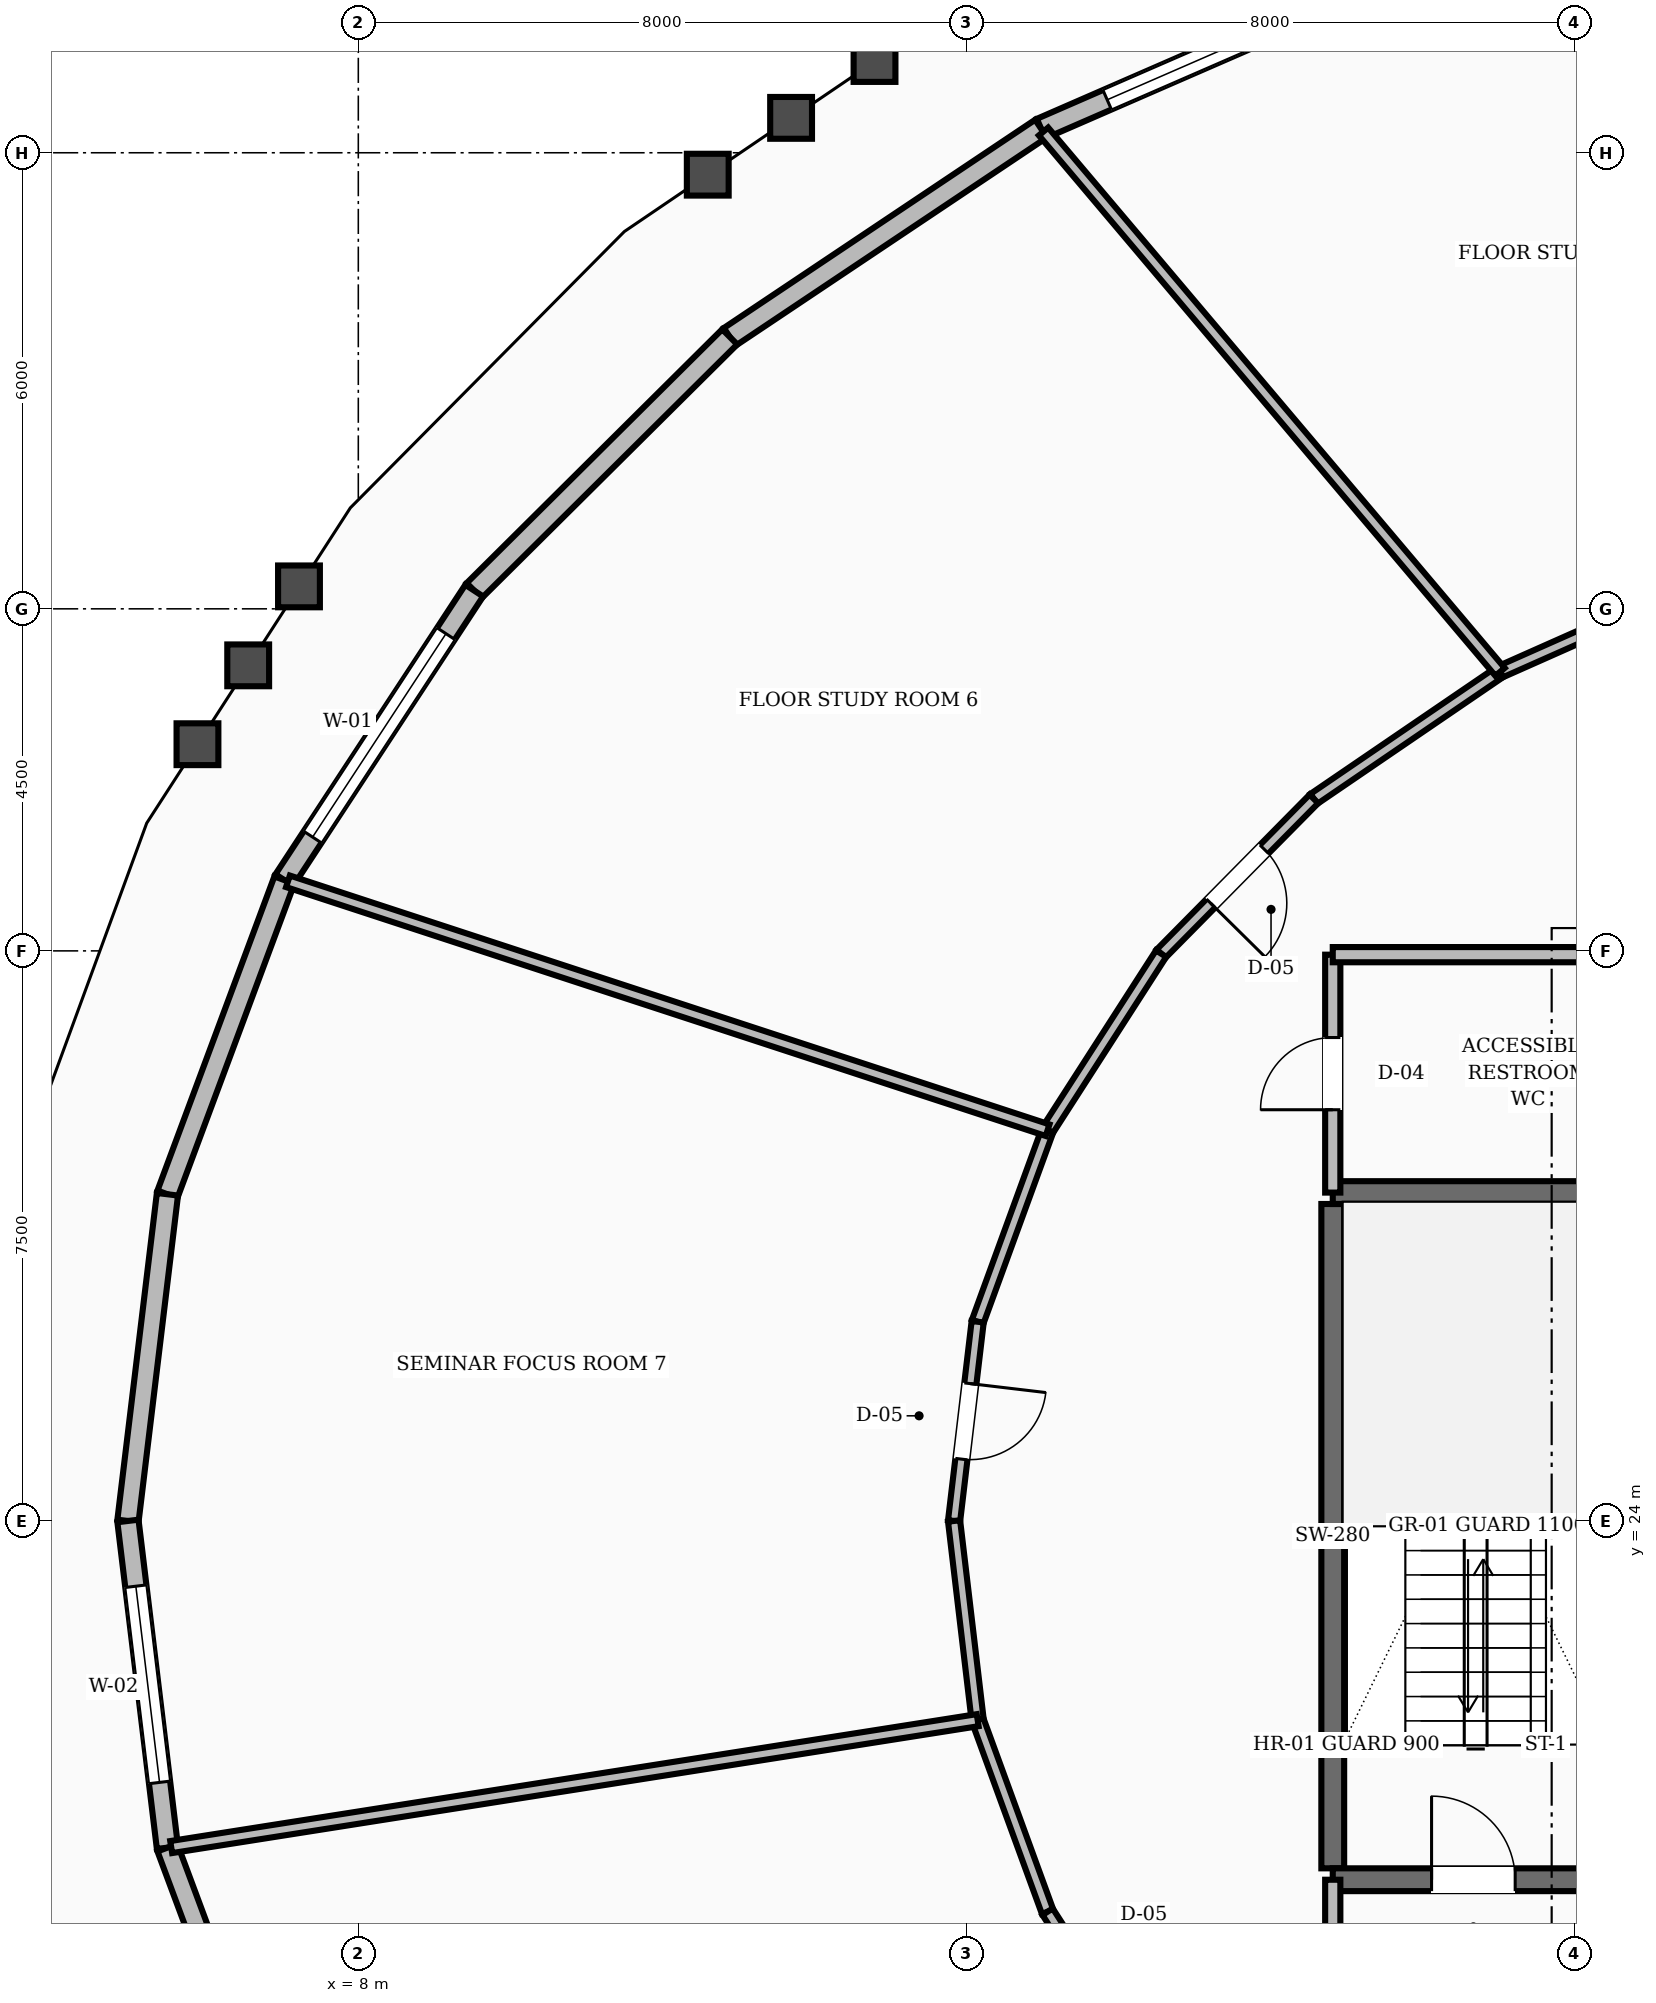
"""IFC4 building model, lengths in metres.
Left out: names, types, materials, properties, quantities, classifications, styles, units other than length and angle.
Written with IfcOpenShell. Run it as: python <this file> out.ifc"""

import sys

from ifc_helpers import new_model, si_unit, direction, frame, frame_2d, origin, place, context, subcontext, project, spatial, rectangle, extrude, element, fill, save


model = new_model("IFC4")
c1 = context("Model", 3, precision=1e-05, world=origin(), true_north=direction((0.0, 1.0)))
c2 = subcontext(c1, "Body", "Model", "MODEL_VIEW")
j1 = project(units=[si_unit("LENGTHUNIT", "METRE"), si_unit("PLANEANGLEUNIT", "RADIAN")], contexts=[c1])
p1 = place(None, origin())
s1 = spatial("IfcSite", under=j1, at=p1, CompositionType="ELEMENT")
p2 = place(p1, origin())
s2 = spatial("IfcBuilding", under=s1, at=p2, CompositionType="ELEMENT")
p3 = place(p2, frame((0.0, 0.0, 77.2)))
s3 = spatial("IfcBuildingStorey", under=s2, at=p3, CompositionType="ELEMENT", Elevation=77.2)
p4 = place(p3, frame((20.82, 19.43, 0.0), z_axis=(0.0, 0.0, 1.0), x_axis=(0.0, 1.0, 0.0)))
e1 = element("IfcWall", 1, at=p4, inside=s3, PredefinedType="SHEAR", context=c2, shape_type="SweptSolid", body=[
    extrude(rectangle(XDim=8.74, YDim=0.3, at=frame_2d((4.37, 0.0))), origin(), (0.0, 0.0, 1.0), 3.6),
])
p5 = place(p3, frame((20.82, 19.28, 0.0), z_axis=(0.0, 0.0, 1.0), x_axis=(1.0, 0.0, 0.0)))
e2 = element("IfcWall", 2, at=p5, inside=s3, PredefinedType="SHEAR", context=c2, shape_type="SweptSolid", body=[
    extrude(rectangle(XDim=3.6, YDim=0.3, at=frame_2d((1.8, 0.0))), origin(), (0.0, 0.0, 1.0), 3.6),
])
p6 = place(p5, frame((1.3, 0.0, 0.0)))
e3 = element("IfcOpeningElement", 3, at=p6, cuts=e2, PredefinedType="OPENING", context=c2, shape_type="SweptSolid", body=[
    extrude(rectangle(XDim=1.1, YDim=2.1, at=frame_2d((0.55, 1.05))), frame((0.0, 0.16, 0.0), z_axis=(0.0, -1.0, 0.0), x_axis=(1.0, 0.0, 0.0)), (0.0, 0.0, 1.0), 0.32),
])
p7 = place(p3, frame((20.82, 28.32, 0.0), z_axis=(0.0, 0.0, 1.0), x_axis=(1.0, 0.0, 0.0)))
e4 = element("IfcWall", 4, at=p7, inside=s3, PredefinedType="SHEAR", context=c2, shape_type="SweptSolid", body=[
    extrude(rectangle(XDim=3.6, YDim=0.3, at=frame_2d((1.8, 0.0))), origin(), (0.0, 0.0, 1.0), 3.6),
])
p8 = place(p3, frame((21.656, 44.354, 0.0), z_axis=(0.0, 0.0, 1.0), x_axis=(-0.916792657637, -0.399363522249, 0.0)))
e5 = element("IfcWall", 5, at=p8, inside=s3, PredefinedType="STANDARD", context=c2, shape_type="SweptSolid", body=[
    extrude(rectangle(XDim=5.097, YDim=0.28, at=frame_2d((2.549, 0.0))), origin(), (0.0, 0.0, 1.0), 2.71),
])
p9 = place(p8, frame((0.949, 0.0, 0.8)))
e6 = element("IfcOpeningElement", 6, at=p9, cuts=e5, PredefinedType="OPENING", context=c2, shape_type="SweptSolid", body=[
    extrude(rectangle(XDim=3.2, YDim=1.65, at=frame_2d((1.6, 0.825))), frame((0.0, 0.15, 0.0), z_axis=(0.0, -1.0, 0.0), x_axis=(1.0, 0.0, 0.0)), (0.0, 0.0, 1.0), 0.3),
])
p10 = place(p3, frame((16.983, 42.318, 0.0), z_axis=(0.0, 0.0, 1.0), x_axis=(-0.83118805146, -0.555991387623, 0.0)))
e7 = element("IfcWall", 7, at=p10, inside=s3, PredefinedType="STANDARD", context=c2, shape_type="SweptSolid", body=[
    extrude(rectangle(XDim=4.928, YDim=0.28, at=frame_2d((2.464, 0.0))), origin(), (0.0, 0.0, 1.0), 2.71),
])
p11 = place(p3, frame((12.886, 39.578, 0.0), z_axis=(0.0, 0.0, 1.0), x_axis=(-0.709550335899, -0.704654752929, 0.0)))
e8 = element("IfcWall", 8, at=p11, inside=s3, PredefinedType="STANDARD", context=c2, shape_type="SweptSolid", body=[
    extrude(rectangle(XDim=4.738, YDim=0.28, at=frame_2d((2.369, 0.0))), origin(), (0.0, 0.0, 1.0), 2.71),
])
p12 = place(p3, frame((9.525, 36.24, 0.0), z_axis=(0.0, 0.0, 1.0), x_axis=(-0.548388300237, -0.836223817027, 0.0)))
e9 = element("IfcWall", 9, at=p12, inside=s3, PredefinedType="STANDARD", context=c2, shape_type="SweptSolid", body=[
    extrude(rectangle(XDim=4.555, YDim=0.28, at=frame_2d((2.277, 0.0))), origin(), (0.0, 0.0, 1.0), 2.71),
])
p13 = place(p12, frame((0.677, 0.0, 0.8)))
e10 = element("IfcOpeningElement", 10, at=p13, cuts=e9, PredefinedType="OPENING", context=c2, shape_type="SweptSolid", body=[
    extrude(rectangle(XDim=3.2, YDim=1.65, at=frame_2d((1.6, 0.825))), frame((0.0, 0.15, 0.0), z_axis=(0.0, -1.0, 0.0), x_axis=(1.0, 0.0, 0.0)), (0.0, 0.0, 1.0), 0.3),
])
p14 = place(p3, frame((7.027, 32.431, 0.0), z_axis=(0.0, 0.0, 1.0), x_axis=(-0.348859248306, -0.93717513031, 0.0)))
e11 = element("IfcWall", 11, at=p14, inside=s3, PredefinedType="STANDARD", context=c2, shape_type="SweptSolid", body=[
    extrude(rectangle(XDim=4.41, YDim=0.28, at=frame_2d((2.205, 0.0))), origin(), (0.0, 0.0, 1.0), 2.71),
])
p15 = place(p3, frame((5.489, 28.298, 0.0), z_axis=(0.0, 0.0, 1.0), x_axis=(-0.119945698674, -0.992780453761, 0.0)))
e12 = element("IfcWall", 12, at=p15, inside=s3, PredefinedType="STANDARD", context=c2, shape_type="SweptSolid", body=[
    extrude(rectangle(XDim=4.329, YDim=0.28, at=frame_2d((2.165, 0.0))), origin(), (0.0, 0.0, 1.0), 2.71),
])
p16 = place(p3, frame((4.969, 24.0, 0.0), z_axis=(0.0, 0.0, 1.0), x_axis=(0.119945698674, -0.992780453761, 0.0)))
e13 = element("IfcWall", 13, at=p16, inside=s3, PredefinedType="STANDARD", context=c2, shape_type="SweptSolid", body=[
    extrude(rectangle(XDim=4.329, YDim=0.28, at=frame_2d((2.165, 0.0))), origin(), (0.0, 0.0, 1.0), 2.71),
])
p17 = place(p16, frame((0.865, 0.0, 0.8)))
e14 = element("IfcOpeningElement", 14, at=p17, cuts=e13, PredefinedType="OPENING", context=c2, shape_type="SweptSolid", body=[
    extrude(rectangle(XDim=2.6, YDim=1.65, at=frame_2d((1.3, 0.825))), frame((0.0, 0.15, 0.0), z_axis=(0.0, -1.0, 0.0), x_axis=(1.0, 0.0, 0.0)), (0.0, 0.0, 1.0), 0.3),
])
p18 = place(p3, frame((5.489, 19.702, 0.0), z_axis=(0.0, 0.0, 1.0), x_axis=(0.348859248306, -0.93717513031, 0.0)))
e15 = element("IfcWall", 15, at=p18, inside=s3, PredefinedType="STANDARD", context=c2, shape_type="SweptSolid", body=[
    extrude(rectangle(XDim=4.41, YDim=0.28, at=frame_2d((2.205, 0.0))), origin(), (0.0, 0.0, 1.0), 2.71),
])
p19 = place(p3, frame((20.82, 16.55, 0.0), z_axis=(0.0, 0.0, 1.0), x_axis=(0.0, 1.0, 0.0)))
e16 = element("IfcWall", 16, at=p19, inside=s3, PredefinedType="SOLIDWALL", context=c2, shape_type="SweptSolid", body=[
    extrude(rectangle(XDim=2.73, YDim=0.2, at=frame_2d((1.365, 0.0))), origin(), (0.0, 0.0, 1.0), 2.71),
])
p20 = place(p19, frame((0.815, 0.0, 0.0)))
e17 = element("IfcOpeningElement", 17, at=p20, cuts=e16, PredefinedType="OPENING", context=c2, shape_type="SweptSolid", body=[
    extrude(rectangle(XDim=1.1, YDim=2.1, at=frame_2d((0.55, 1.05))), frame((0.0, 0.11, 0.0), z_axis=(0.0, -1.0, 0.0), x_axis=(1.0, 0.0, 0.0)), (0.0, 0.0, 1.0), 0.22),
])
p21 = place(p3, frame((20.82, 28.32, 0.0), z_axis=(0.0, 0.0, 1.0), x_axis=(0.0, 1.0, 0.0)))
e18 = element("IfcWall", 18, at=p21, inside=s3, PredefinedType="SOLIDWALL", context=c2, shape_type="SweptSolid", body=[
    extrude(rectangle(XDim=3.13, YDim=0.2, at=frame_2d((1.565, 0.0))), origin(), (0.0, 0.0, 1.0), 2.71),
])
p22 = place(p21, frame((1.09, 0.0, 0.0)))
e19 = element("IfcOpeningElement", 19, at=p22, cuts=e18, PredefinedType="OPENING", context=c2, shape_type="SweptSolid", body=[
    extrude(rectangle(XDim=0.95, YDim=2.1, at=frame_2d((0.475, 1.05))), frame((0.0, 0.11, 0.0), z_axis=(0.0, -1.0, 0.0), x_axis=(1.0, 0.0, 0.0)), (0.0, 0.0, 1.0), 0.22),
])
p23 = place(p3, frame((20.82, 31.45, 0.0), z_axis=(0.0, 0.0, 1.0), x_axis=(1.0, 0.0, 0.0)))
e20 = element("IfcWall", 20, at=p23, inside=s3, PredefinedType="SOLIDWALL", context=c2, shape_type="SweptSolid", body=[
    extrude(rectangle(XDim=3.98, YDim=0.2, at=frame_2d((1.99, 0.0))), origin(), (0.0, 0.0, 1.0), 2.71),
])
p24 = place(p3, frame((25.815, 36.411, 0.0), z_axis=(0.0, 0.0, 1.0), x_axis=(-0.913860932409, -0.406027334321, 0.0)))
e21 = element("IfcWall", 21, at=p24, inside=s3, PredefinedType="SOLIDWALL", context=c2, shape_type="SweptSolid", body=[
    extrude(rectangle(XDim=3.058, YDim=0.16, at=frame_2d((1.529, 0.0))), origin(), (0.0, 0.0, 1.0), 2.71),
])
p25 = place(p3, frame((23.021, 35.17, 0.0), z_axis=(0.0, 0.0, 1.0), x_axis=(-0.826112340767, -0.563505457323, 0.0)))
e22 = element("IfcWall", 22, at=p25, inside=s3, PredefinedType="SOLIDWALL", context=c2, shape_type="SweptSolid", body=[
    extrude(rectangle(XDim=2.965, YDim=0.16, at=frame_2d((1.482, 0.0))), origin(), (0.0, 0.0, 1.0), 2.71),
])
p26 = place(p3, frame((20.572, 33.499, 0.0), z_axis=(0.0, 0.0, 1.0), x_axis=(-0.702569520063, -0.711615113301, 0.0)))
e23 = element("IfcWall", 23, at=p26, inside=s3, PredefinedType="SOLIDWALL", context=c2, shape_type="SweptSolid", body=[
    extrude(rectangle(XDim=2.861, YDim=0.16, at=frame_2d((1.43, 0.0))), origin(), (0.0, 0.0, 1.0), 2.71),
])
p27 = place(p26, frame((0.93, 0.0, 0.0)))
e24 = element("IfcOpeningElement", 24, at=p27, cuts=e23, PredefinedType="OPENING", context=c2, shape_type="SweptSolid", body=[
    extrude(rectangle(XDim=1.0, YDim=2.1, at=frame_2d((0.5, 1.05))), frame((0.0, 0.09, 0.0), z_axis=(0.0, -1.0, 0.0), x_axis=(1.0, 0.0, 0.0)), (0.0, 0.0, 1.0), 0.18),
])
p28 = place(p3, frame((18.562, 31.463, 0.0), z_axis=(0.0, 0.0, 1.0), x_axis=(-0.540891657444, -0.841092274907, 0.0)))
e25 = element("IfcWall", 25, at=p28, inside=s3, PredefinedType="SOLIDWALL", context=c2, shape_type="SweptSolid", body=[
    extrude(rectangle(XDim=2.761, YDim=0.16, at=frame_2d((1.38, 0.0))), origin(), (0.0, 0.0, 1.0), 2.71),
])
p29 = place(p3, frame((17.068, 29.141, 0.0), z_axis=(0.0, 0.0, 1.0), x_axis=(-0.342882618672, -0.939378257047, 0.0)))
e26 = element("IfcWall", 26, at=p29, inside=s3, PredefinedType="SOLIDWALL", context=c2, shape_type="SweptSolid", body=[
    extrude(rectangle(XDim=2.683, YDim=0.16, at=frame_2d((1.341, 0.0))), origin(), (0.0, 0.0, 1.0), 2.71),
])
p30 = place(p3, frame((16.148, 26.621, 0.0), z_axis=(0.0, 0.0, 1.0), x_axis=(-0.117667763342, -0.993053018459, 0.0)))
e27 = element("IfcWall", 27, at=p30, inside=s3, PredefinedType="SOLIDWALL", context=c2, shape_type="SweptSolid", body=[
    extrude(rectangle(XDim=2.639, YDim=0.16, at=frame_2d((1.32, 0.0))), origin(), (0.0, 0.0, 1.0), 2.71),
])
p31 = place(p30, frame((0.82, 0.0, 0.0)))
e28 = element("IfcOpeningElement", 28, at=p31, cuts=e27, PredefinedType="OPENING", context=c2, shape_type="SweptSolid", body=[
    extrude(rectangle(XDim=1.0, YDim=2.1, at=frame_2d((0.5, 1.05))), frame((0.0, 0.09, 0.0), z_axis=(0.0, -1.0, 0.0), x_axis=(1.0, 0.0, 0.0)), (0.0, 0.0, 1.0), 0.18),
])
p32 = place(p3, frame((15.838, 24.0, 0.0), z_axis=(0.0, 0.0, 1.0), x_axis=(0.117667763342, -0.993053018459, 0.0)))
e29 = element("IfcWall", 29, at=p32, inside=s3, PredefinedType="SOLIDWALL", context=c2, shape_type="SweptSolid", body=[
    extrude(rectangle(XDim=2.639, YDim=0.16, at=frame_2d((1.32, 0.0))), origin(), (0.0, 0.0, 1.0), 2.71),
])
p33 = place(p3, frame((16.148, 21.379, 0.0), z_axis=(0.0, 0.0, 1.0), x_axis=(0.342882618672, -0.939378257047, 0.0)))
e30 = element("IfcWall", 30, at=p33, inside=s3, PredefinedType="SOLIDWALL", context=c2, shape_type="SweptSolid", body=[
    extrude(rectangle(XDim=2.683, YDim=0.16, at=frame_2d((1.341, 0.0))), origin(), (0.0, 0.0, 1.0), 2.71),
])
p34 = place(p3, frame((17.068, 18.859, 0.0), z_axis=(0.0, 0.0, 1.0), x_axis=(0.540891657444, -0.841092274907, 0.0)))
e31 = element("IfcWall", 31, at=p34, inside=s3, PredefinedType="SOLIDWALL", context=c2, shape_type="SweptSolid", body=[
    extrude(rectangle(XDim=2.761, YDim=0.16, at=frame_2d((1.38, 0.0))), origin(), (0.0, 0.0, 1.0), 2.71),
])
p35 = place(p34, frame((0.881, 0.0, 0.0)))
e32 = element("IfcOpeningElement", 32, at=p35, cuts=e31, PredefinedType="OPENING", context=c2, shape_type="SweptSolid", body=[
    extrude(rectangle(XDim=1.0, YDim=2.1, at=frame_2d((0.5, 1.05))), frame((0.0, 0.09, 0.0), z_axis=(0.0, -1.0, 0.0), x_axis=(1.0, 0.0, 0.0)), (0.0, 0.0, 1.0), 0.18),
])
p36 = place(p3, frame((23.021, 35.17, 0.0), z_axis=(0.0, 0.0, 1.0), x_axis=(-0.645332911196, 0.763901455508, 0.0)))
e33 = element("IfcWall", 33, at=p36, inside=s3, PredefinedType="SOLIDWALL", context=c2, shape_type="SweptSolid", body=[
    extrude(rectangle(XDim=9.307, YDim=0.16, at=frame_2d((4.653, 0.0))), origin(), (0.0, 0.0, 1.0), 2.71),
])
p37 = place(p3, frame((17.068, 29.141, 0.0), z_axis=(0.0, 0.0, 1.0), x_axis=(-0.950307251603, 0.311313551826, 0.0)))
e34 = element("IfcWall", 34, at=p37, inside=s3, PredefinedType="SOLIDWALL", context=c2, shape_type="SweptSolid", body=[
    extrude(rectangle(XDim=10.517, YDim=0.16, at=frame_2d((5.258, 0.0))), origin(), (0.0, 0.0, 1.0), 2.71),
])
p38 = place(p3, frame((16.148, 21.379, 0.0), z_axis=(0.0, 0.0, 1.0), x_axis=(-0.987847228952, -0.155427964831, 0.0)))
e35 = element("IfcWall", 35, at=p38, inside=s3, PredefinedType="SOLIDWALL", context=c2, shape_type="SweptSolid", body=[
    extrude(rectangle(XDim=10.741, YDim=0.16, at=frame_2d((5.371, 0.0))), origin(), (0.0, 0.0, 1.0), 2.71),
])
p39 = place(p9, origin())
e36 = element("IfcWindow", 36, at=p39, inside=s3, PartitioningType="SINGLE_PANEL", PredefinedType="WINDOW", context=c2, shape_type="SweptSolid", body=[
    extrude(rectangle(XDim=3.2, YDim=1.65, at=frame_2d((1.6, 0.825))), frame((0.0, 0.03, 0.0), z_axis=(0.0, -1.0, 0.0), x_axis=(1.0, 0.0, 0.0)), (0.0, 0.0, 1.0), 0.06),
])
fill(e6, e36)
p40 = place(p13, origin())
e37 = element("IfcWindow", 37, at=p40, inside=s3, PartitioningType="SINGLE_PANEL", PredefinedType="WINDOW", context=c2, shape_type="SweptSolid", body=[
    extrude(rectangle(XDim=3.2, YDim=1.65, at=frame_2d((1.6, 0.825))), frame((0.0, 0.03, 0.0), z_axis=(0.0, -1.0, 0.0), x_axis=(1.0, 0.0, 0.0)), (0.0, 0.0, 1.0), 0.06),
])
fill(e10, e37)
p41 = place(p17, origin())
e38 = element("IfcWindow", 38, at=p41, inside=s3, PartitioningType="SINGLE_PANEL", PredefinedType="WINDOW", context=c2, shape_type="SweptSolid", body=[
    extrude(rectangle(XDim=2.6, YDim=1.65, at=frame_2d((1.3, 0.825))), frame((0.0, 0.03, 0.0), z_axis=(0.0, -1.0, 0.0), x_axis=(1.0, 0.0, 0.0)), (0.0, 0.0, 1.0), 0.06),
])
fill(e14, e38)
p42 = place(p6, origin())
e39 = element("IfcDoor", 39, at=p42, inside=s3, OperationType="SINGLE_SWING_LEFT", PredefinedType="DOOR", context=c2, shape_type="SweptSolid", body=[
    extrude(rectangle(XDim=1.1, YDim=2.1, at=frame_2d((0.55, 1.05))), frame((0.0, 0.025, 0.0), z_axis=(0.0, -1.0, 0.0), x_axis=(1.0, 0.0, 0.0)), (0.0, 0.0, 1.0), 0.05),
])
fill(e3, e39)
p43 = place(p22, origin())
e40 = element("IfcDoor", 40, at=p43, inside=s3, OperationType="SINGLE_SWING_LEFT", PredefinedType="DOOR", context=c2, shape_type="SweptSolid", body=[
    extrude(rectangle(XDim=0.95, YDim=2.1, at=frame_2d((0.475, 1.05))), frame((0.0, 0.025, 0.0), z_axis=(0.0, -1.0, 0.0), x_axis=(1.0, 0.0, 0.0)), (0.0, 0.0, 1.0), 0.05),
])
fill(e19, e40)
p44 = place(p27, origin())
e41 = element("IfcDoor", 41, at=p44, inside=s3, OperationType="SINGLE_SWING_RIGHT", PredefinedType="DOOR", context=c2, shape_type="SweptSolid", body=[
    extrude(rectangle(XDim=1.0, YDim=2.1, at=frame_2d((0.5, 1.05))), frame((0.0, 0.025, 0.0), z_axis=(0.0, -1.0, 0.0), x_axis=(1.0, 0.0, 0.0)), (0.0, 0.0, 1.0), 0.05),
])
fill(e24, e41)
p45 = place(p31, origin())
e42 = element("IfcDoor", 42, at=p45, inside=s3, OperationType="SINGLE_SWING_LEFT", PredefinedType="DOOR", context=c2, shape_type="SweptSolid", body=[
    extrude(rectangle(XDim=1.0, YDim=2.1, at=frame_2d((0.5, 1.05))), frame((0.0, 0.025, 0.0), z_axis=(0.0, -1.0, 0.0), x_axis=(1.0, 0.0, 0.0)), (0.0, 0.0, 1.0), 0.05),
])
fill(e28, e42)
save(model, sys.argv[1])
